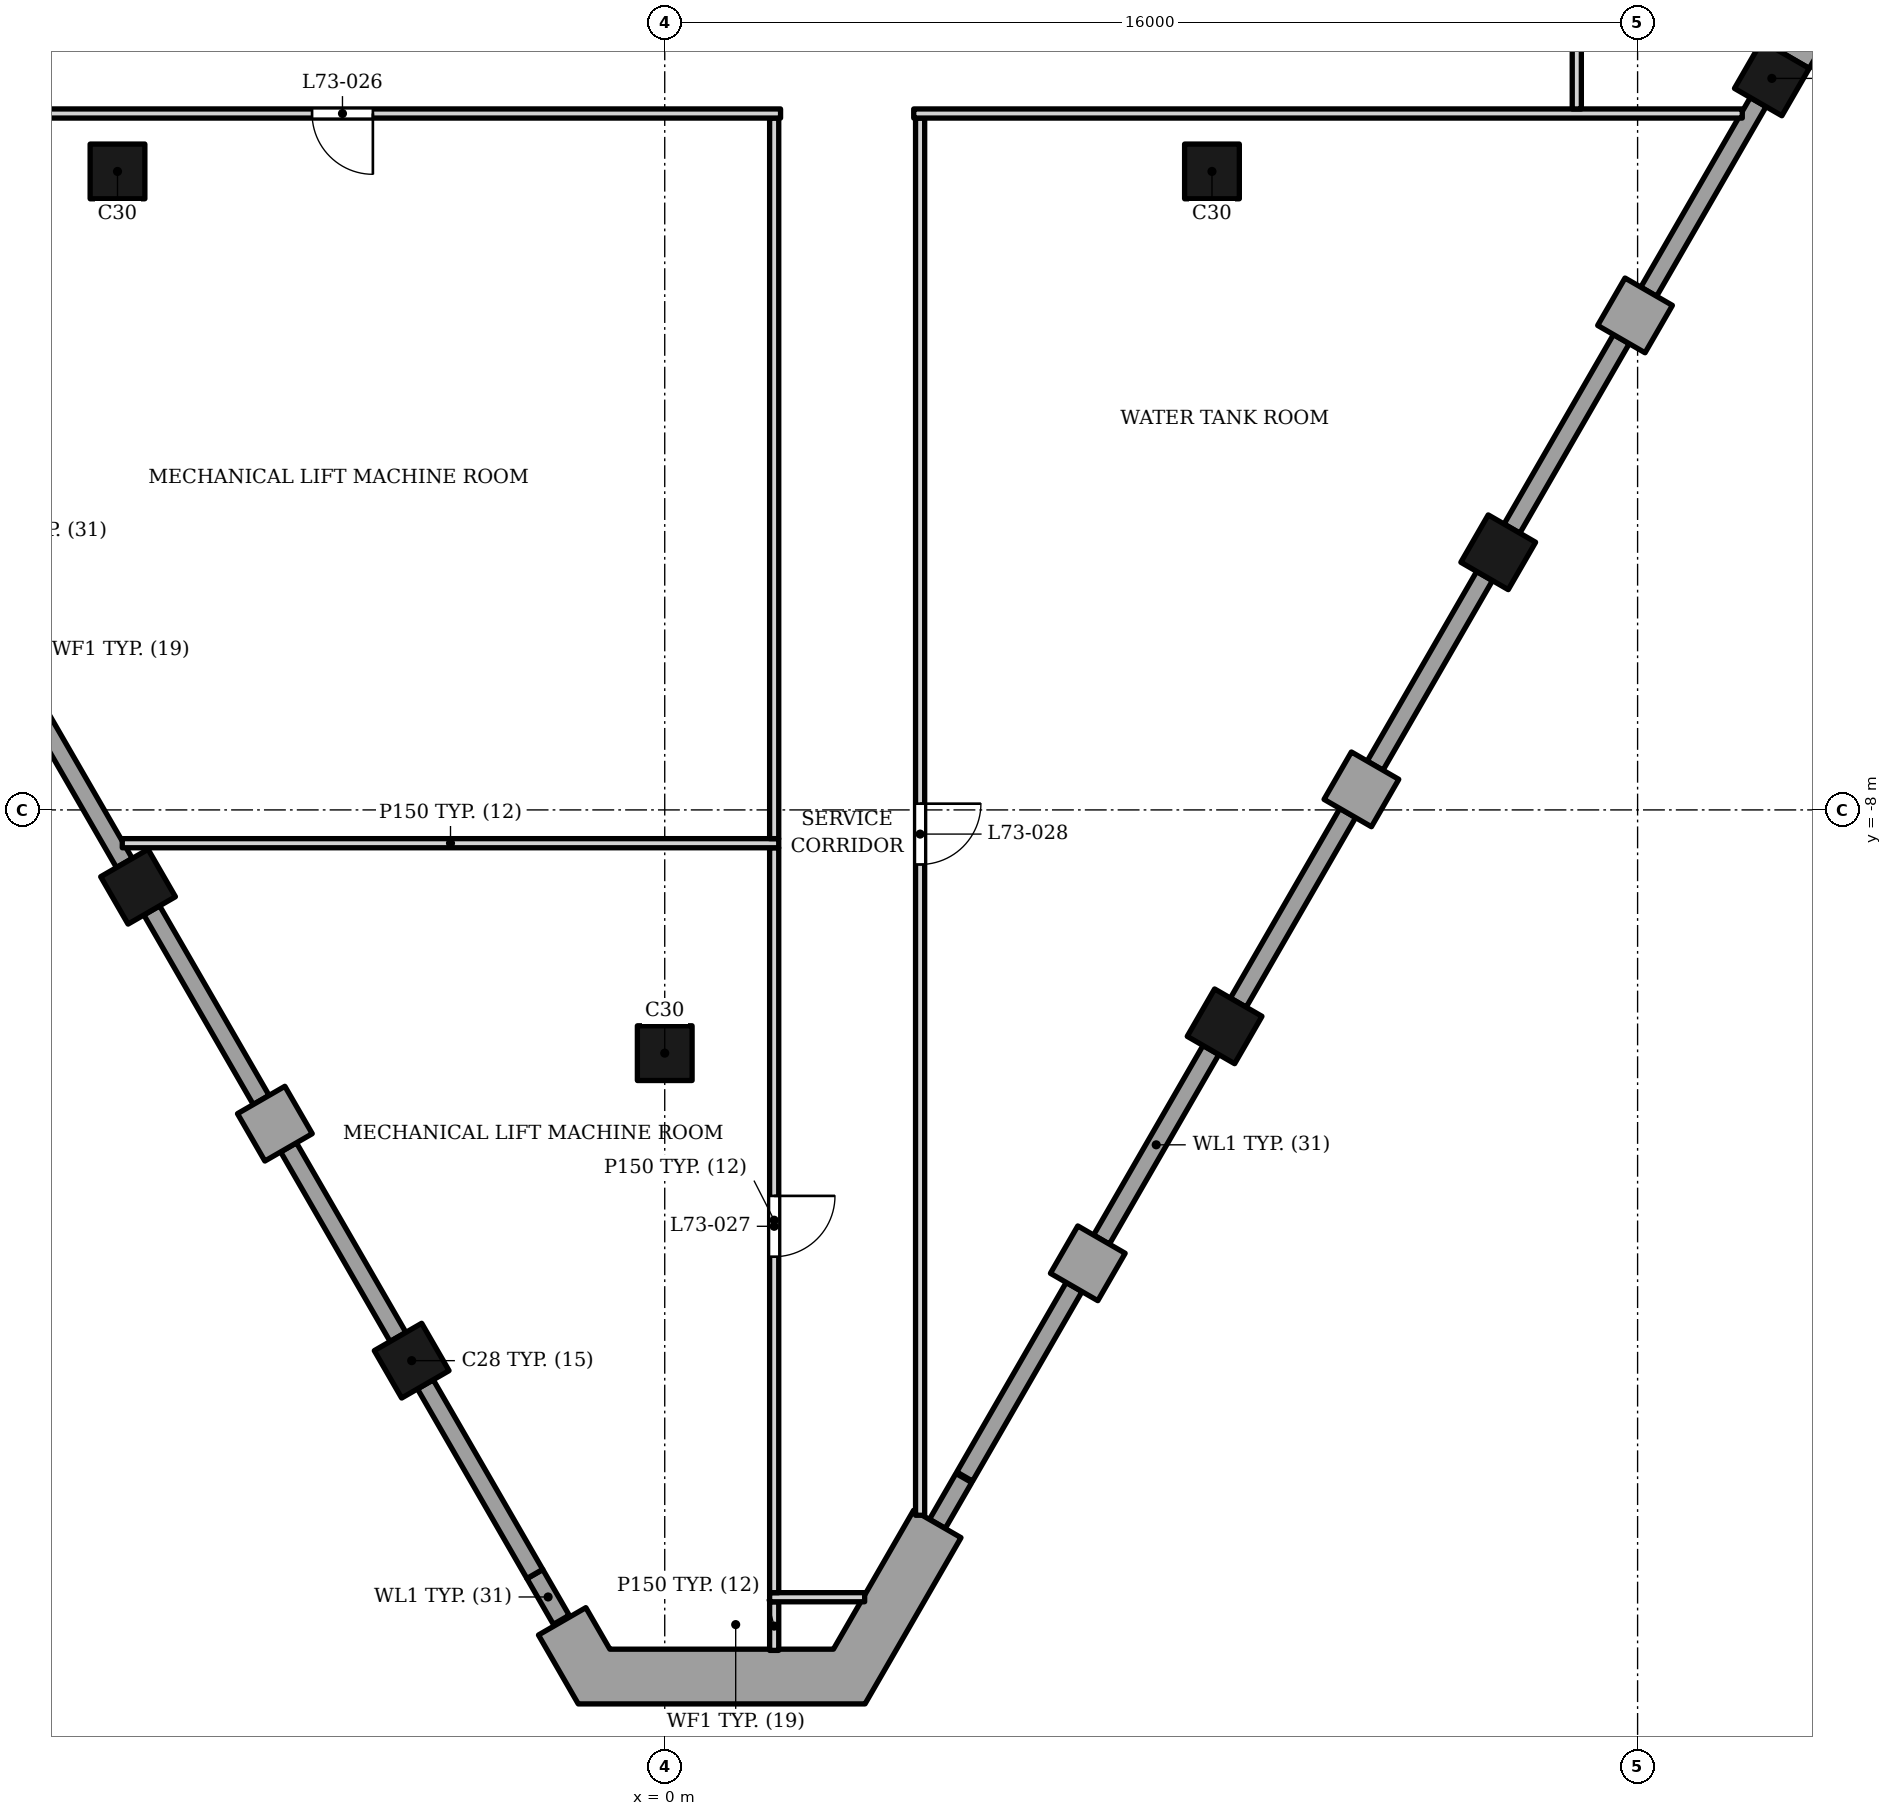
"""IFC4 building model, lengths in metres.
Left out: names, types, materials, properties, quantities, classifications, styles, units other than length and angle.
Written with IfcOpenShell. Run it as: python <this file> out.ifc"""

import sys

from ifc_helpers import new_model, si_unit, direction, frame, frame_2d, origin, origin_2d, place, context, subcontext, project, spatial, polyline, rectangle, outline, extrude, element, fill, save


model = new_model("IFC4")
c1 = context("Model", 3, precision=1e-05, world=origin(), true_north=direction((0.0, 1.0)))
c2 = subcontext(c1, "Body", "Model", "MODEL_VIEW")
j1 = project(units=[si_unit("LENGTHUNIT", "METRE"), si_unit("PLANEANGLEUNIT", "RADIAN")], contexts=[c1])
p1 = place(None, origin())
s1 = spatial("IfcSite", under=j1, at=p1, CompositionType="ELEMENT")
p2 = place(p1, origin())
s2 = spatial("IfcBuilding", under=s1, at=p2, CompositionType="ELEMENT")
p3 = place(p2, frame((0.0, 0.0, 310.5)))
s3 = spatial("IfcBuildingStorey", under=s2, at=p3, CompositionType="ELEMENT", Elevation=310.5)
for number, where, z_axis, x_axis in (
    (1, (-9.0, 2.5, 0.0), (0.0, 0.0, 1.0), (1.0, 0.0, 0.0)),
    (2, (9.0, 2.5, 0.0), (0.0, 0.0, 1.0), (1.0, 0.0, 0.0)),
    (3, (0.0, -12.0, 0.0), (0.0, 0.0, 1.0), (1.0, 0.0, 0.0)),
    (4, (-8.662, -9.263, 0.0), (0.0, 0.0, 1.0), (0.5, -0.866, 0.0)),
    (5, (-4.162, -17.057, 0.0), (0.0, 0.0, 1.0), (0.5, -0.866, 0.0)),
    (6, (9.208, -11.559, 0.0), (0.0, 0.0, 1.0), (0.5, 0.866, 0.0)),
    (7, (13.708, -3.763, 0.0), (0.0, 0.0, 1.0), (0.5, 0.866, 0.0)),
    (8, (18.208, 4.03, 0.0), (0.0, 0.0, 1.0), (0.5, 0.866, 0.0)),
):
    element("IfcColumn", number, at=place(p3, frame(where, z_axis=z_axis, x_axis=x_axis)), inside=s3, PredefinedType="COLUMN", context=c2, shape_type="SweptSolid", body=[
        extrude(rectangle(XDim=0.9, YDim=0.9, at=origin_2d()), origin(), (0.0, 0.0, 1.0), 5.0),
    ])
p4 = place(p3, frame((-6.187, -13.55, 0.0), z_axis=(0.0, 0.0, 1.0), x_axis=(-0.500105887137, 0.865964261186, 0.0)))
e9 = element("IfcWall", 9, at=p4, inside=s3, PredefinedType="SOLIDWALL", context=c2, shape_type="SweptSolid", body=[
    extrude(rectangle(XDim=0.9, YDim=0.9, at=frame_2d((0.45, 0.0))), origin(), (0.0, 0.0, 1.0), 3.8),
])
for number, where, z_axis, x_axis in (
    (10, (-10.687, -5.755, 0.0), (0.0, 0.0, 1.0), (0.5, -0.866, 0.0)),
    (11, (-8.437, -9.652, 0.0), (0.0, 0.0, 1.0), (0.5, -0.866, 0.0)),
    (12, (-6.187, -13.55, 0.0), (0.0, 0.0, 1.0), (0.5, -0.866, 0.0)),
    (13, (-3.937, -17.447, 0.0), (0.0, 0.0, 1.0), (0.5, -0.866, 0.0)),
):
    element("IfcWall", number, at=place(p3, frame(where, z_axis=z_axis, x_axis=x_axis)), inside=s3, PredefinedType="ELEMENTEDWALL", context=c2, shape_type="SweptSolid", body=[
        extrude(rectangle(XDim=3.6, YDim=0.3, at=frame_2d((1.8, 0.0))), origin(), (0.0, 0.0, 1.0), 3.8),
    ])
for number, where, z_axis, x_axis in (
    (14, (7.348, -15.681, 0.0), (0.0, 0.0, 1.0), (-0.866, 0.5, 0.0)),
    (15, (11.068, -7.437, 0.0), (0.0, 0.0, 1.0), (0.866, -0.5, 0.0)),
    (16, (15.568, 0.357, 0.0), (0.0, 0.0, 1.0), (0.866, -0.5, 0.0)),
):
    element("IfcWall", number, at=place(p3, frame(where, z_axis=z_axis, x_axis=x_axis)), inside=s3, PredefinedType="SOLIDWALL", context=c2, shape_type="SweptSolid", body=[
        extrude(rectangle(XDim=0.9, YDim=0.9, at=frame_2d((0.45, 0.0))), origin(), (0.0, 0.0, 1.0), 3.8),
    ])
for number, where, z_axis, x_axis in (
    (17, (4.933, -18.963, 0.0), (0.0, 0.0, 1.0), (0.5, 0.866, 0.0)),
    (18, (7.183, -15.066, 0.0), (0.0, 0.0, 1.0), (0.5, 0.866, 0.0)),
    (19, (9.433, -11.169, 0.0), (0.0, 0.0, 1.0), (0.5, 0.866, 0.0)),
    (20, (11.683, -7.272, 0.0), (0.0, 0.0, 1.0), (0.5, 0.866, 0.0)),
):
    element("IfcWall", number, at=place(p3, frame(where, z_axis=z_axis, x_axis=x_axis)), inside=s3, PredefinedType="ELEMENTEDWALL", context=c2, shape_type="SweptSolid", body=[
        extrude(rectangle(XDim=3.6, YDim=0.3, at=frame_2d((1.8, 0.0))), origin(), (0.0, 0.0, 1.0), 3.8),
    ])
p5 = place(p3, origin())
e21 = element("IfcWall", 21, at=p5, inside=s3, PredefinedType="ELEMENTEDWALL", context=c2, shape_type="SweptSolid", body=[
    extrude(outline(polyline([(15.603, -0.182), (13.804, -3.299), (14.063, -3.449), (15.863, -0.332), (15.603, -0.182)])), origin(), (0.0, 0.0, 1.0), 3.8),
])
p6 = place(p3, frame((16.183, 0.522, 0.0), z_axis=(0.0, 0.0, 1.0), x_axis=(0.500012057535, 0.866018442252, 0.0)))
e22 = element("IfcWall", 22, at=p6, inside=s3, PredefinedType="ELEMENTEDWALL", context=c2, shape_type="SweptSolid", body=[
    extrude(rectangle(XDim=3.6, YDim=0.3, at=frame_2d((1.8, 0.0))), origin(), (0.0, 0.0, 1.0), 3.8),
])
p7 = place(p3, origin())
e23 = element("IfcWall", 23, at=p7, inside=s3, PredefinedType="SOLIDWALL", context=c2, shape_type="SweptSolid", body=[
    extrude(outline(polyline([(-1.297, -21.119), (-2.077, -21.569), (-1.422, -22.702), (3.294, -22.702), (4.873, -19.968), (4.093, -19.518), (2.774, -21.802), (-0.903, -21.802), (-1.297, -21.119)])), origin(), (0.0, 0.0, 1.0), 3.8),
])
p8 = place(p3, origin())
e24 = element("IfcWall", 24, at=p8, inside=s3, PredefinedType="SOLIDWALL", context=c2, shape_type="SweptSolid", body=[
    extrude(outline(polyline([(18.823, 4.194), (18.823, 4.194), (20.247, 6.661), (21.059, 7.549), (20.395, 8.156), (19.516, 7.196), (18.043, 4.645), (18.823, 4.195), (18.823, 4.194)])), origin(), (0.0, 0.0, 1.0), 3.8),
])
p9 = place(p3, frame((-1.701, -21.319, 0.0), z_axis=(0.0, 0.0, 1.0), x_axis=(-0.499893013529, 0.866087163642, 0.0)))
e25 = element("IfcWall", 25, at=p9, inside=s3, PredefinedType="ELEMENTEDWALL", context=c2, shape_type="SweptSolid", body=[
    extrude(rectangle(XDim=0.867, YDim=0.3, at=frame_2d((0.434, 0.0))), origin(), (0.0, 0.0, 1.0), 3.8),
])
p10 = place(p3, frame((4.485, -19.74, 0.0), z_axis=(0.0, 0.0, 1.0), x_axis=(0.500127794843, 0.865951608824, 0.0)))
e26 = element("IfcWall", 26, at=p10, inside=s3, PredefinedType="ELEMENTEDWALL", context=c2, shape_type="SweptSolid", body=[
    extrude(rectangle(XDim=0.869, YDim=0.3, at=frame_2d((0.435, 0.0))), origin(), (0.0, 0.0, 1.0), 3.8),
])
p11 = place(p3, frame((1.8, -21.822, 0.0), z_axis=(0.0, 0.0, 1.0), x_axis=(0.0, 1.0, 0.0)))
e27 = element("IfcWall", 27, at=p11, inside=s3, PredefinedType="PARTITIONING", context=c2, shape_type="SweptSolid", body=[
    extrude(rectangle(XDim=0.799, YDim=0.15, at=frame_2d((0.4, 0.0))), origin(), (0.0, 0.0, 1.0), 4.8),
])
p12 = place(p3, frame((1.725, -20.948, 0.0), z_axis=(0.0, 0.0, 1.0), x_axis=(1.0, 0.0, 0.0)))
e28 = element("IfcWall", 28, at=p12, inside=s3, PredefinedType="PARTITIONING", context=c2, shape_type="SweptSolid", body=[
    extrude(rectangle(XDim=1.563, YDim=0.15, at=frame_2d((0.781, 0.0))), origin(), (0.0, 0.0, 1.0), 4.8),
])
p13 = place(p3, frame((1.8, -20.872, 0.0), z_axis=(0.0, 0.0, 1.0), x_axis=(0.0, 1.0, 0.0)))
e29 = element("IfcWall", 29, at=p13, inside=s3, PredefinedType="PARTITIONING", context=c2, shape_type="SweptSolid", body=[
    extrude(rectangle(XDim=12.25, YDim=0.15, at=frame_2d((6.125, 0.0))), origin(), (0.0, 0.0, 1.0), 4.02),
])
p14 = place(p13, frame((5.525, 0.0, 0.0)))
e30 = element("IfcOpeningElement", 30, at=p14, cuts=e29, PredefinedType="OPENING", context=c2, shape_type="SweptSolid", body=[
    extrude(rectangle(XDim=1.0, YDim=2.1, at=frame_2d((0.5, 1.05))), frame((0.0, 0.085, 0.0), z_axis=(0.0, -1.0, 0.0), x_axis=(1.0, 0.0, 0.0)), (0.0, 0.0, 1.0), 0.17),
])
p15 = place(p3, frame((4.2, -19.6, 0.0), z_axis=(0.0, 0.0, 1.0), x_axis=(0.0, 1.0, 0.0)))
e31 = element("IfcWall", 31, at=p15, inside=s3, PredefinedType="PARTITIONING", context=c2, shape_type="SweptSolid", body=[
    extrude(rectangle(XDim=22.977, YDim=0.15, at=frame_2d((11.489, 0.0))), origin(), (0.0, 0.0, 1.0), 4.02),
])
p16 = place(p15, frame((10.702, 0.0, 0.0)))
e32 = element("IfcOpeningElement", 32, at=p16, cuts=e31, PredefinedType="OPENING", context=c2, shape_type="SweptSolid", body=[
    extrude(rectangle(XDim=1.0, YDim=2.1, at=frame_2d((0.5, 1.05))), frame((0.0, 0.085, 0.0), z_axis=(0.0, -1.0, 0.0), x_axis=(1.0, 0.0, 0.0)), (0.0, 0.0, 1.0), 0.17),
])
p17 = place(p3, frame((-8.922, -8.547, 0.0), z_axis=(0.0, 0.0, 1.0), x_axis=(1.0, 0.0, 0.0)))
e33 = element("IfcWall", 33, at=p17, inside=s3, PredefinedType="PARTITIONING", context=c2, shape_type="SweptSolid", body=[
    extrude(rectangle(XDim=10.797, YDim=0.15, at=frame_2d((5.398, 0.0))), origin(), (0.0, 0.0, 1.0), 3.812),
])
p18 = place(p3, frame((1.8, -8.472, 0.0), z_axis=(0.0, 0.0, 1.0), x_axis=(0.0, 1.0, 0.0)))
e34 = element("IfcWall", 34, at=p18, inside=s3, PredefinedType="PARTITIONING", context=c2, shape_type="SweptSolid", body=[
    extrude(rectangle(XDim=11.85, YDim=0.15, at=frame_2d((5.925, 0.0))), origin(), (0.0, 0.0, 1.0), 4.8),
])
p19 = place(p3, frame((-15.85, 3.453, 0.0), z_axis=(0.0, 0.0, 1.0), x_axis=(1.0, 0.0, 0.0)))
e35 = element("IfcWall", 35, at=p19, inside=s3, PredefinedType="PARTITIONING", context=c2, shape_type="SweptSolid", body=[
    extrude(rectangle(XDim=17.755, YDim=0.15, at=frame_2d((8.877, 0.0))), origin(), (0.0, 0.0, 1.0), 3.812),
])
p20 = place(p19, frame((10.05, 0.0, 0.0)))
e36 = element("IfcOpeningElement", 36, at=p20, cuts=e35, PredefinedType="OPENING", context=c2, shape_type="SweptSolid", body=[
    extrude(rectangle(XDim=1.0, YDim=2.1, at=frame_2d((0.5, 1.05))), frame((0.0, 0.085, 0.0), z_axis=(0.0, -1.0, 0.0), x_axis=(1.0, 0.0, 0.0)), (0.0, 0.0, 1.0), 0.17),
])
p21 = place(p3, frame((4.095, 3.453, 0.0), z_axis=(0.0, 0.0, 1.0), x_axis=(1.0, 0.0, 0.0)))
e37 = element("IfcWall", 37, at=p21, inside=s3, PredefinedType="PARTITIONING", context=c2, shape_type="SweptSolid", body=[
    extrude(rectangle(XDim=13.627, YDim=0.15, at=frame_2d((6.813, 0.0))), origin(), (0.0, 0.0, 1.0), 3.954),
])
p22 = place(p3, frame((15.0, 3.528, 0.0), z_axis=(0.0, 0.0, 1.0), x_axis=(0.0, 1.0, 0.0)))
e38 = element("IfcWall", 38, at=p22, inside=s3, PredefinedType="PARTITIONING", context=c2, shape_type="SweptSolid", body=[
    extrude(rectangle(XDim=15.83, YDim=0.15, at=frame_2d((7.915, 0.0))), origin(), (0.0, 0.0, 1.0), 4.02),
])
p23 = place(p22, frame((7.392, 0.0, 0.0)))
e39 = element("IfcOpeningElement", 39, at=p23, cuts=e38, PredefinedType="OPENING", context=c2, shape_type="SweptSolid", body=[
    extrude(rectangle(XDim=1.0, YDim=2.1, at=frame_2d((0.5, 1.05))), frame((0.0, 0.085, 0.0), z_axis=(0.0, -1.0, 0.0), x_axis=(1.0, 0.0, 0.0)), (0.0, 0.0, 1.0), 0.17),
])
p24 = place(p20, origin())
e40 = element("IfcDoor", 40, at=p24, inside=s3, OperationType="SINGLE_SWING_RIGHT", PredefinedType="DOOR", context=c2, shape_type="SweptSolid", body=[
    extrude(rectangle(XDim=1.0, YDim=2.1, at=frame_2d((0.5, 1.05))), frame((0.0, 0.025, 0.0), z_axis=(0.0, -1.0, 0.0), x_axis=(1.0, 0.0, 0.0)), (0.0, 0.0, 1.0), 0.05),
])
fill(e36, e40)
p25 = place(p14, origin())
e41 = element("IfcDoor", 41, at=p25, inside=s3, OperationType="SINGLE_SWING_RIGHT", PredefinedType="DOOR", context=c2, shape_type="SweptSolid", body=[
    extrude(rectangle(XDim=1.0, YDim=2.1, at=frame_2d((0.5, 1.05))), frame((0.0, 0.025, 0.0), z_axis=(0.0, -1.0, 0.0), x_axis=(1.0, 0.0, 0.0)), (0.0, 0.0, 1.0), 0.05),
])
fill(e30, e41)
p26 = place(p16, origin())
e42 = element("IfcDoor", 42, at=p26, inside=s3, OperationType="SINGLE_SWING_RIGHT", PredefinedType="DOOR", context=c2, shape_type="SweptSolid", body=[
    extrude(rectangle(XDim=1.0, YDim=2.1, at=frame_2d((0.5, 1.05))), frame((0.0, 0.025, 0.0), z_axis=(0.0, -1.0, 0.0), x_axis=(1.0, 0.0, 0.0)), (0.0, 0.0, 1.0), 0.05),
])
fill(e32, e42)
save(model, sys.argv[1])
